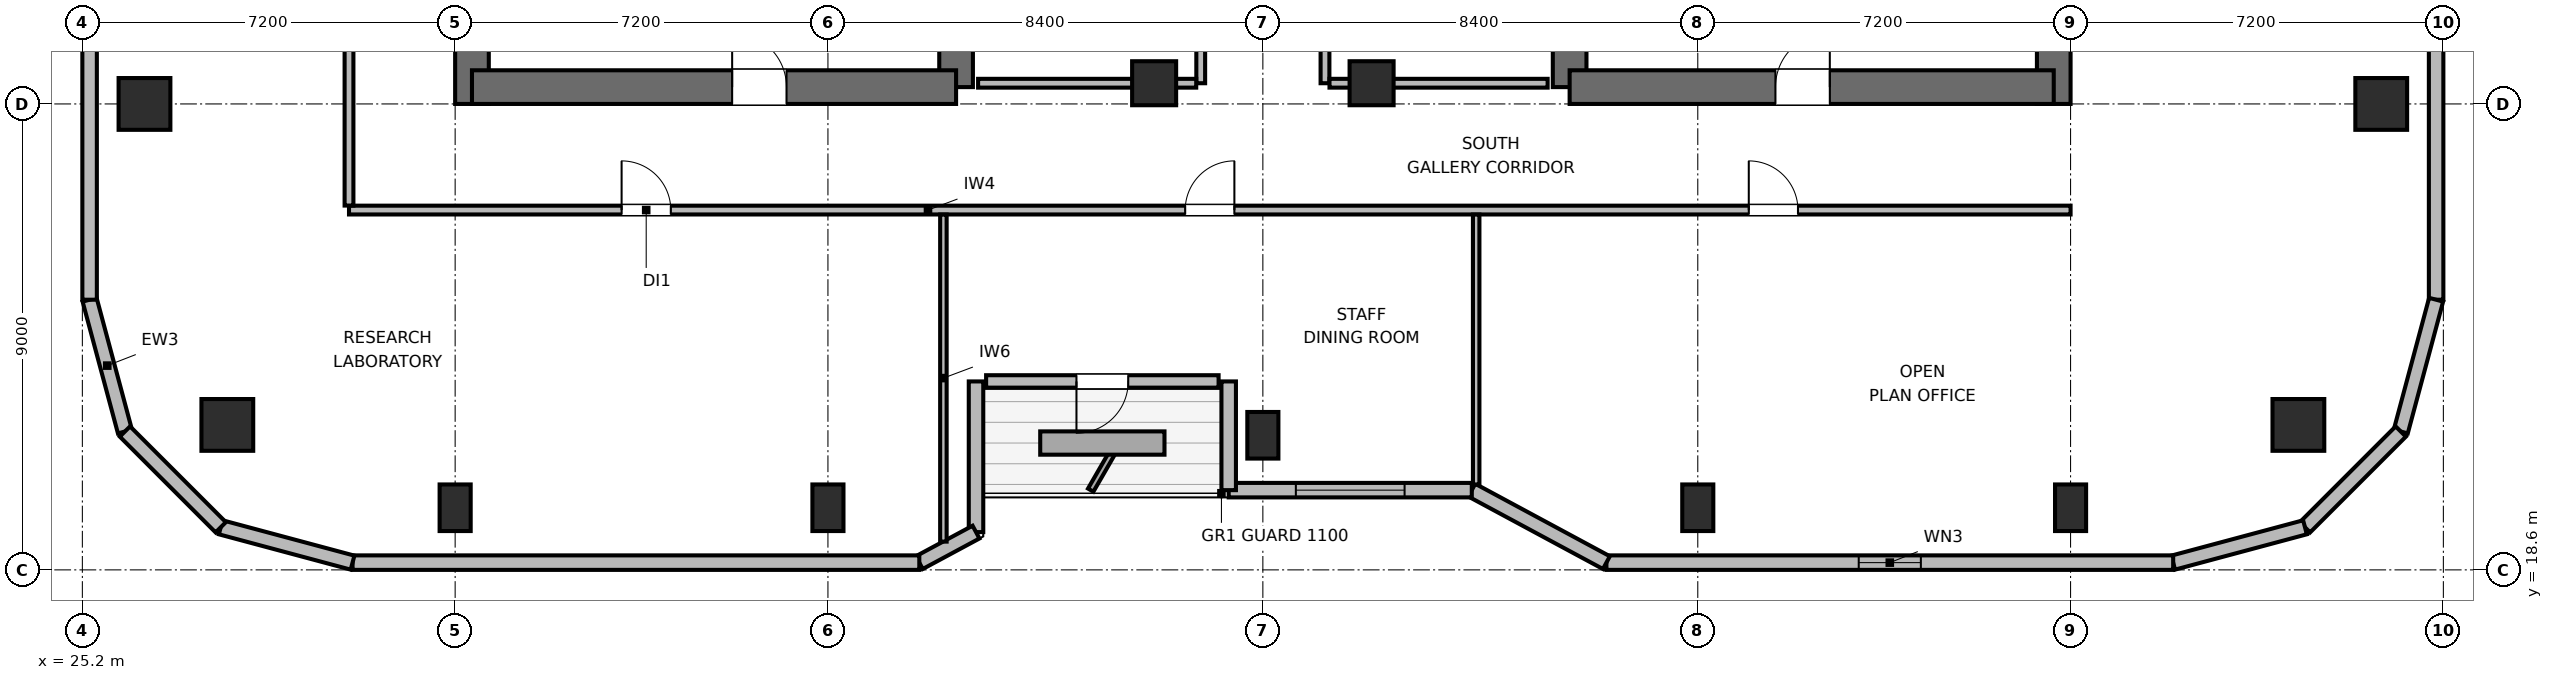
"""IFC4 building model, lengths in metres.
Left out: names, types, materials, properties, quantities, classifications, styles, units other than length and angle.
Written with IfcOpenShell. Run it as: python <this file> out.ifc"""

import sys

from ifc_helpers import new_model, si_unit, direction, frame, frame_2d, origin, origin_2d, place, context, subcontext, project, spatial, rectangle, circle, extrude, element, fill, save


model = new_model("IFC4")
c1 = context("Model", 3, precision=1e-05, world=origin(), true_north=direction((0.0, 1.0)))
c2 = subcontext(c1, "Body", "Model", "MODEL_VIEW")
j1 = project(units=[si_unit("LENGTHUNIT", "METRE"), si_unit("PLANEANGLEUNIT", "RADIAN")], contexts=[c1])
p1 = place(None, origin())
s1 = spatial("IfcSite", under=j1, at=p1, CompositionType="ELEMENT")
p2 = place(p1, origin())
s2 = spatial("IfcBuilding", under=s1, at=p2, CompositionType="ELEMENT")
p3 = place(p2, frame((0.0, 0.0, 231.0)))
s3 = spatial("IfcBuildingStorey", under=s2, at=p3, CompositionType="ELEMENT", Elevation=231.0)
p4 = place(p3, frame((32.725, 27.6, 0.0), z_axis=(0.0, 0.0, 1.0), x_axis=(0.0, 1.0, 0.0)))
e1 = element("IfcWall", 1, at=p4, inside=s3, PredefinedType="SHEAR", context=c2, shape_type="SweptSolid", body=[
    extrude(rectangle(XDim=16.8, YDim=0.65, at=frame_2d((8.4, 0.0))), origin(), (0.0, 0.0, 1.0), 3.9),
])
p5 = place(p3, frame((42.075, 27.925, 0.0), z_axis=(0.0, 0.0, 1.0), x_axis=(0.0, 1.0, 0.0)))
e2 = element("IfcWall", 2, at=p5, inside=s3, PredefinedType="SHEAR", context=c2, shape_type="SweptSolid", body=[
    extrude(rectangle(XDim=6.475, YDim=0.65, at=frame_2d((3.237, 0.0))), origin(), (0.0, 0.0, 1.0), 3.9),
])
p6 = place(p3, frame((32.725, 27.925, 0.0), z_axis=(0.0, 0.0, 1.0), x_axis=(1.0, 0.0, 0.0)))
e3 = element("IfcWall", 3, at=p6, inside=s3, PredefinedType="SHEAR", context=c2, shape_type="SweptSolid", body=[
    extrude(rectangle(XDim=9.35, YDim=0.65, at=frame_2d((4.675, 0.0))), origin(), (0.0, 0.0, 1.0), 3.9),
])
p7 = place(p6, frame((5.025, 0.0, 0.0)))
e4 = element("IfcOpeningElement", 4, at=p7, cuts=e3, PredefinedType="OPENING", context=c2, shape_type="SweptSolid", body=[
    extrude(rectangle(XDim=1.05, YDim=2.04, at=frame_2d((0.525, 1.02))), frame((0.0, 0.335, 0.0), z_axis=(0.0, -1.0, 0.0), x_axis=(1.0, 0.0, 0.0)), (0.0, 0.0, 1.0), 0.67),
])
p8 = place(p3, frame((53.925, 27.925, 0.0), z_axis=(0.0, 0.0, 1.0), x_axis=(0.0, 1.0, 0.0)))
e5 = element("IfcWall", 5, at=p8, inside=s3, PredefinedType="SHEAR", context=c2, shape_type="SweptSolid", body=[
    extrude(rectangle(XDim=7.875, YDim=0.65, at=frame_2d((3.938, 0.0))), origin(), (0.0, 0.0, 1.0), 3.9),
])
p9 = place(p3, frame((63.275, 27.6, 0.0), z_axis=(0.0, 0.0, 1.0), x_axis=(0.0, 1.0, 0.0)))
e6 = element("IfcWall", 6, at=p9, inside=s3, PredefinedType="SHEAR", context=c2, shape_type="SweptSolid", body=[
    extrude(rectangle(XDim=16.8, YDim=0.65, at=frame_2d((8.4, 0.0))), origin(), (0.0, 0.0, 1.0), 3.9),
])
p10 = place(p3, frame((53.925, 27.925, 0.0), z_axis=(0.0, 0.0, 1.0), x_axis=(1.0, 0.0, 0.0)))
e7 = element("IfcWall", 7, at=p10, inside=s3, PredefinedType="SHEAR", context=c2, shape_type="SweptSolid", body=[
    extrude(rectangle(XDim=9.35, YDim=0.65, at=frame_2d((4.675, 0.0))), origin(), (0.0, 0.0, 1.0), 3.9),
])
p11 = place(p10, frame((3.975, 0.0, 0.0)))
e8 = element("IfcOpeningElement", 8, at=p11, cuts=e7, PredefinedType="OPENING", context=c2, shape_type="SweptSolid", body=[
    extrude(rectangle(XDim=1.05, YDim=2.04, at=frame_2d((0.525, 1.02))), frame((0.0, 0.335, 0.0), z_axis=(0.0, -1.0, 0.0), x_axis=(1.0, 0.0, 0.0)), (0.0, 0.0, 1.0), 0.67),
])
for number, where, z_axis, x_axis in (
    (9, (28.0, 21.4, 0.0), (0.0, 0.0, 1.0), (1.0, 0.0, 0.0)),
    (10, (68.0, 21.4, 0.0), (0.0, 0.0, 1.0), (1.0, 0.0, 0.0)),
):
    element("IfcColumn", number, at=place(p3, frame(where, z_axis=z_axis, x_axis=x_axis)), inside=s3, PredefinedType="COLUMN", context=c2, shape_type="SweptSolid", body=[
        extrude(circle(Radius=0.5, at=origin_2d()), origin(), (0.0, 0.0, 1.0), 3.9),
    ])
for number, where, z_axis, x_axis in (
    (11, (32.4, 19.8, 0.0), (0.0, 0.0, 1.0), (1.0, 0.0, 0.0)),
    (12, (39.6, 19.8, 0.0), (0.0, 0.0, 1.0), (1.0, 0.0, 0.0)),
    (13, (48.0, 21.2, 0.0), (0.0, 0.0, 1.0), (1.0, 0.0, 0.0)),
    (14, (56.4, 19.8, 0.0), (0.0, 0.0, 1.0), (1.0, 0.0, 0.0)),
    (15, (63.6, 19.8, 0.0), (0.0, 0.0, 1.0), (1.0, 0.0, 0.0)),
):
    element("IfcColumn", number, at=place(p3, frame(where, z_axis=z_axis, x_axis=x_axis)), inside=s3, PredefinedType="COLUMN", context=c2, shape_type="SweptSolid", body=[
        extrude(rectangle(XDim=0.6, YDim=0.9, at=origin_2d()), origin(), (0.0, 0.0, 1.0), 3.9),
    ])
for number, where, z_axis, x_axis in (
    (16, (26.4, 27.6, 0.0), (0.0, 0.0, 1.0), (1.0, 0.0, 0.0)),
    (17, (69.6, 27.6, 0.0), (0.0, 0.0, 1.0), (1.0, 0.0, 0.0)),
):
    element("IfcColumn", number, at=place(p3, frame(where, z_axis=z_axis, x_axis=x_axis)), inside=s3, PredefinedType="COLUMN", context=c2, shape_type="SweptSolid", body=[
        extrude(rectangle(XDim=1.0, YDim=1.0, at=origin_2d()), origin(), (0.0, 0.0, 1.0), 3.9),
    ])
for number, where, z_axis, x_axis in (
    (18, (45.9, 28.0, 0.0), (0.0, 0.0, 1.0), (1.0, 0.0, 0.0)),
    (19, (50.1, 28.0, 0.0), (0.0, 0.0, 1.0), (1.0, 0.0, 0.0)),
):
    element("IfcColumn", number, at=place(p3, frame(where, z_axis=z_axis, x_axis=x_axis)), inside=s3, PredefinedType="COLUMN", context=c2, shape_type="SweptSolid", body=[
        extrude(rectangle(XDim=0.85, YDim=0.85, at=origin_2d()), origin(), (0.0, 0.0, 1.0), 3.9),
    ])
p12 = place(p3, frame((26.022, 21.272, 0.0), z_axis=(0.0, 0.0, 1.0), x_axis=(-0.2588904131, 0.965906700466, 0.0)))
e20 = element("IfcWall", 20, at=p12, inside=s3, PredefinedType="SOLIDWALL", context=c2, shape_type="SweptSolid", body=[
    extrude(rectangle(XDim=2.636, YDim=0.28, at=frame_2d((1.318, 0.0))), origin(), (0.0, 0.0, 1.0), 3.68),
])
p13 = place(p3, frame((25.34, 23.818, 0.0), z_axis=(0.0, 0.0, 1.0), x_axis=(0.0, 1.0, 0.0)))
e21 = element("IfcWall", 21, at=p13, inside=s3, PredefinedType="SOLIDWALL", context=c2, shape_type="SweptSolid", body=[
    extrude(rectangle(XDim=5.442, YDim=0.28, at=frame_2d((2.721, 0.0))), origin(), (0.0, 0.0, 1.0), 3.68),
])
p14 = place(p3, frame((70.66, 37.66, 0.0), z_axis=(0.0, 0.0, 1.0), x_axis=(0.0, -1.0, 0.0)))
e22 = element("IfcWall", 22, at=p14, inside=s3, PredefinedType="SOLIDWALL", context=c2, shape_type="SweptSolid", body=[
    extrude(rectangle(XDim=13.842, YDim=0.28, at=frame_2d((6.921, 0.0))), origin(), (0.0, 0.0, 1.0), 3.68),
])
p15 = place(p14, frame((5.871, 0.0, 0.85)))
e23 = element("IfcOpeningElement", 23, at=p15, cuts=e22, PredefinedType="OPENING", context=c2, shape_type="SweptSolid", body=[
    extrude(rectangle(XDim=2.1, YDim=1.05, at=frame_2d((1.05, 0.525))), frame((0.0, 0.15, 0.0), z_axis=(0.0, -1.0, 0.0), x_axis=(1.0, 0.0, 0.0)), (0.0, 0.0, 1.0), 0.3),
])
p16 = place(p3, frame((70.66, 23.818, 0.0), z_axis=(0.0, 0.0, 1.0), x_axis=(-0.2588904131, -0.965906700466, 0.0)))
e24 = element("IfcWall", 24, at=p16, inside=s3, PredefinedType="SOLIDWALL", context=c2, shape_type="SweptSolid", body=[
    extrude(rectangle(XDim=2.636, YDim=0.28, at=frame_2d((1.318, 0.0))), origin(), (0.0, 0.0, 1.0), 3.68),
])
p17 = place(p3, frame((69.978, 21.272, 0.0), z_axis=(0.0, 0.0, 1.0), x_axis=(-0.707153437963, -0.707060121331, 0.0)))
e25 = element("IfcWall", 25, at=p17, inside=s3, PredefinedType="SOLIDWALL", context=c2, shape_type="SweptSolid", body=[
    extrude(rectangle(XDim=2.616, YDim=0.28, at=frame_2d((1.308, 0.0))), origin(), (0.0, 0.0, 1.0), 3.68),
])
p18 = place(p3, frame((68.127, 19.423, 0.0), z_axis=(0.0, 0.0, 1.0), x_axis=(-0.965883534663, -0.258976828051, 0.0)))
e26 = element("IfcWall", 26, at=p18, inside=s3, PredefinedType="SOLIDWALL", context=c2, shape_type="SweptSolid", body=[
    extrude(rectangle(XDim=2.636, YDim=0.28, at=frame_2d((1.318, 0.0))), origin(), (0.0, 0.0, 1.0), 3.68),
])
p19 = place(p3, frame((65.582, 18.74, 0.0), z_axis=(0.0, 0.0, 1.0), x_axis=(-1.0, 0.0, 0.0)))
e27 = element("IfcWall", 27, at=p19, inside=s3, PredefinedType="SOLIDWALL", context=c2, shape_type="SweptSolid", body=[
    extrude(rectangle(XDim=10.946, YDim=0.28, at=frame_2d((5.473, 0.0))), origin(), (0.0, 0.0, 1.0), 3.68),
])
p20 = place(p19, frame((4.873, 0.0, 0.85)))
e28 = element("IfcOpeningElement", 28, at=p20, cuts=e27, PredefinedType="OPENING", context=c2, shape_type="SweptSolid", body=[
    extrude(rectangle(XDim=1.2, YDim=1.1, at=frame_2d((0.6, 0.55))), frame((0.0, 0.15, 0.0), z_axis=(0.0, -1.0, 0.0), x_axis=(1.0, 0.0, 0.0)), (0.0, 0.0, 1.0), 0.3),
])
p21 = place(p3, frame((54.635, 18.74, 0.0), z_axis=(0.0, 0.0, 1.0), x_axis=(-0.880473754814, 0.474094892488, 0.0)))
e29 = element("IfcWall", 29, at=p21, inside=s3, PredefinedType="SOLIDWALL", context=c2, shape_type="SweptSolid", body=[
    extrude(rectangle(XDim=2.953, YDim=0.28, at=frame_2d((1.477, 0.0))), origin(), (0.0, 0.0, 1.0), 2.265),
])
p22 = place(p3, frame((52.035, 20.14, 0.0), z_axis=(0.0, 0.0, 1.0), x_axis=(-1.0, 0.0, 0.0)))
e30 = element("IfcWall", 30, at=p22, inside=s3, PredefinedType="SOLIDWALL", context=c2, shape_type="SweptSolid", body=[
    extrude(rectangle(XDim=4.695, YDim=0.28, at=frame_2d((2.348, 0.0))), origin(), (0.0, 0.0, 1.0), 2.265),
])
p23 = place(p22, frame((1.298, 0.0, 0.85)))
e31 = element("IfcOpeningElement", 31, at=p23, cuts=e30, PredefinedType="OPENING", context=c2, shape_type="SweptSolid", body=[
    extrude(rectangle(XDim=2.1, YDim=1.05, at=frame_2d((1.05, 0.525))), frame((0.0, 0.15, 0.0), z_axis=(0.0, -1.0, 0.0), x_axis=(1.0, 0.0, 0.0)), (0.0, 0.0, 1.0), 0.3),
])
p24 = place(p3, frame((47.34, 20.14, 0.0), z_axis=(0.0, 0.0, 1.0), x_axis=(0.0, 1.0, 0.0)))
e32 = element("IfcWall", 32, at=p24, inside=s3, PredefinedType="SOLIDWALL", context=c2, shape_type="SweptSolid", body=[
    extrude(rectangle(XDim=2.1, YDim=0.28, at=frame_2d((1.05, 0.0))), origin(), (0.0, 0.0, 1.0), 2.265),
])
p25 = place(p3, frame((47.145, 22.24, 0.0), z_axis=(0.0, 0.0, 1.0), x_axis=(-1.0, 0.0, 0.0)))
e33 = element("IfcWall", 33, at=p25, inside=s3, PredefinedType="SOLIDWALL", context=c2, shape_type="SweptSolid", body=[
    extrude(rectangle(XDim=4.49, YDim=0.24, at=frame_2d((2.245, 0.0))), origin(), (0.0, 0.0, 1.0), 3.68),
])
p26 = place(p25, frame((1.745, 0.0, 0.0)))
e34 = element("IfcOpeningElement", 34, at=p26, cuts=e33, PredefinedType="OPENING", context=c2, shape_type="SweptSolid", body=[
    extrude(rectangle(XDim=1.0, YDim=2.02, at=frame_2d((0.5, 1.01))), frame((0.0, 0.13, 0.0), z_axis=(0.0, -1.0, 0.0), x_axis=(1.0, 0.0, 0.0)), (0.0, 0.0, 1.0), 0.26),
])
p27 = place(p3, frame((42.46, 22.24, 0.0), z_axis=(0.0, 0.0, 1.0), x_axis=(0.0, -1.0, 0.0)))
e35 = element("IfcWall", 35, at=p27, inside=s3, PredefinedType="SOLIDWALL", context=c2, shape_type="SweptSolid", body=[
    extrude(rectangle(XDim=2.91, YDim=0.28, at=frame_2d((1.455, 0.0))), origin(), (0.0, 0.0, 1.0), 2.265),
])
p28 = place(p3, frame((42.46, 19.33, 0.0), z_axis=(0.0, 0.0, 1.0), x_axis=(-0.880515214249, -0.474017887296, 0.0)))
e36 = element("IfcWall", 36, at=p28, inside=s3, PredefinedType="SOLIDWALL", context=c2, shape_type="SweptSolid", body=[
    extrude(rectangle(XDim=1.244, YDim=0.28, at=frame_2d((0.622, 0.0))), origin(), (0.0, 0.0, 1.0), 3.68),
])
p29 = place(p3, frame((41.365, 18.74, 0.0), z_axis=(0.0, 0.0, 1.0), x_axis=(-1.0, 0.0, 0.0)))
e37 = element("IfcWall", 37, at=p29, inside=s3, PredefinedType="SOLIDWALL", context=c2, shape_type="SweptSolid", body=[
    extrude(rectangle(XDim=10.946, YDim=0.28, at=frame_2d((5.473, 0.0))), origin(), (0.0, 0.0, 1.0), 3.68),
])
p30 = place(p3, frame((30.418, 18.74, 0.0), z_axis=(0.0, 0.0, 1.0), x_axis=(-0.965883534663, 0.258976828051, 0.0)))
e38 = element("IfcWall", 38, at=p30, inside=s3, PredefinedType="SOLIDWALL", context=c2, shape_type="SweptSolid", body=[
    extrude(rectangle(XDim=2.636, YDim=0.28, at=frame_2d((1.318, 0.0))), origin(), (0.0, 0.0, 1.0), 3.68),
])
p31 = place(p3, frame((27.873, 19.423, 0.0), z_axis=(0.0, 0.0, 1.0), x_axis=(-0.707153437963, 0.707060121331, 0.0)))
e39 = element("IfcWall", 39, at=p31, inside=s3, PredefinedType="SOLIDWALL", context=c2, shape_type="SweptSolid", body=[
    extrude(rectangle(XDim=2.616, YDim=0.28, at=frame_2d((1.308, 0.0))), origin(), (0.0, 0.0, 1.0), 3.68),
])
p32 = place(p3, frame((46.8, 28.0, 0.0), z_axis=(0.0, 0.0, 1.0), x_axis=(0.0, 1.0, 0.0)))
e40 = element("IfcWall", 40, at=p32, inside=s3, PredefinedType="PARTITIONING", context=c2, shape_type="SweptSolid", body=[
    extrude(rectangle(XDim=4.5, YDim=0.17, at=frame_2d((2.25, 0.0))), origin(), (0.0, 0.0, 1.0), 3.68),
])
p33 = place(p32, frame((0.99, 0.0, 0.0)))
e41 = element("IfcOpeningElement", 41, at=p33, cuts=e40, PredefinedType="OPENING", context=c2, shape_type="SweptSolid", body=[
    extrude(rectangle(XDim=0.9, YDim=2.02, at=frame_2d((0.45, 1.01))), frame((0.0, 0.095, 0.0), z_axis=(0.0, -1.0, 0.0), x_axis=(1.0, 0.0, 0.0)), (0.0, 0.0, 1.0), 0.19),
])
p34 = place(p32, frame((3.24, 0.0, 0.0)))
e42 = element("IfcOpeningElement", 42, at=p34, cuts=e40, PredefinedType="OPENING", context=c2, shape_type="SweptSolid", body=[
    extrude(rectangle(XDim=0.9, YDim=2.02, at=frame_2d((0.45, 1.01))), frame((0.0, 0.095, 0.0), z_axis=(0.0, -1.0, 0.0), x_axis=(1.0, 0.0, 0.0)), (0.0, 0.0, 1.0), 0.19),
])
p35 = place(p3, frame((42.5, 28.0, 0.0), z_axis=(0.0, 0.0, 1.0), x_axis=(1.0, 0.0, 0.0)))
e43 = element("IfcWall", 43, at=p35, inside=s3, PredefinedType="PARTITIONING", context=c2, shape_type="SweptSolid", body=[
    extrude(rectangle(XDim=4.213, YDim=0.17, at=frame_2d((2.106, 0.0))), origin(), (0.0, 0.0, 1.0), 2.765),
])
p36 = place(p3, frame((49.2, 28.0, 0.0), z_axis=(0.0, 0.0, 1.0), x_axis=(0.0, 1.0, 0.0)))
e44 = element("IfcWall", 44, at=p36, inside=s3, PredefinedType="PARTITIONING", context=c2, shape_type="SweptSolid", body=[
    extrude(rectangle(XDim=4.5, YDim=0.17, at=frame_2d((2.25, 0.0))), origin(), (0.0, 0.0, 1.0), 3.68),
])
p37 = place(p36, frame((0.675, 0.0, 0.0)))
e45 = element("IfcOpeningElement", 45, at=p37, cuts=e44, PredefinedType="OPENING", context=c2, shape_type="SweptSolid", body=[
    extrude(rectangle(XDim=0.9, YDim=2.02, at=frame_2d((0.45, 1.01))), frame((0.0, 0.095, 0.0), z_axis=(0.0, -1.0, 0.0), x_axis=(1.0, 0.0, 0.0)), (0.0, 0.0, 1.0), 0.19),
])
p38 = place(p36, frame((2.925, 0.0, 0.0)))
e46 = element("IfcOpeningElement", 46, at=p38, cuts=e44, PredefinedType="OPENING", context=c2, shape_type="SweptSolid", body=[
    extrude(rectangle(XDim=0.9, YDim=2.02, at=frame_2d((0.45, 1.01))), frame((0.0, 0.095, 0.0), z_axis=(0.0, -1.0, 0.0), x_axis=(1.0, 0.0, 0.0)), (0.0, 0.0, 1.0), 0.19),
])
p39 = place(p3, frame((49.287, 28.0, 0.0), z_axis=(0.0, 0.0, 1.0), x_axis=(1.0, 0.0, 0.0)))
e47 = element("IfcWall", 47, at=p39, inside=s3, PredefinedType="PARTITIONING", context=c2, shape_type="SweptSolid", body=[
    extrude(rectangle(XDim=4.213, YDim=0.17, at=frame_2d((2.106, 0.0))), origin(), (0.0, 0.0, 1.0), 2.765),
])
p40 = place(p3, frame((30.35, 25.55, 0.0), z_axis=(0.0, 0.0, 1.0), x_axis=(1.0, 0.0, 0.0)))
e48 = element("IfcWall", 48, at=p40, inside=s3, PredefinedType="PARTITIONING", context=c2, shape_type="SweptSolid", body=[
    extrude(rectangle(XDim=33.25, YDim=0.17, at=frame_2d((16.625, 0.0))), origin(), (0.0, 0.0, 1.0), 3.68),
])
p41 = place(p40, frame((5.265, 0.0, 0.0)))
e49 = element("IfcOpeningElement", 49, at=p41, cuts=e48, PredefinedType="OPENING", context=c2, shape_type="SweptSolid", body=[
    extrude(rectangle(XDim=0.95, YDim=2.04, at=frame_2d((0.475, 1.02))), frame((0.0, 0.095, 0.0), z_axis=(0.0, -1.0, 0.0), x_axis=(1.0, 0.0, 0.0)), (0.0, 0.0, 1.0), 0.19),
])
p42 = place(p40, frame((16.15, 0.0, 0.0)))
e50 = element("IfcOpeningElement", 50, at=p42, cuts=e48, PredefinedType="OPENING", context=c2, shape_type="SweptSolid", body=[
    extrude(rectangle(XDim=0.95, YDim=2.04, at=frame_2d((0.475, 1.02))), frame((0.0, 0.095, 0.0), z_axis=(0.0, -1.0, 0.0), x_axis=(1.0, 0.0, 0.0)), (0.0, 0.0, 1.0), 0.19),
])
p43 = place(p40, frame((27.035, 0.0, 0.0)))
e51 = element("IfcOpeningElement", 51, at=p43, cuts=e48, PredefinedType="OPENING", context=c2, shape_type="SweptSolid", body=[
    extrude(rectangle(XDim=0.95, YDim=2.04, at=frame_2d((0.475, 1.02))), frame((0.0, 0.095, 0.0), z_axis=(0.0, -1.0, 0.0), x_axis=(1.0, 0.0, 0.0)), (0.0, 0.0, 1.0), 0.19),
])
p44 = place(p3, frame((30.35, 25.637, 0.0), z_axis=(0.0, 0.0, 1.0), x_axis=(0.0, 1.0, 0.0)))
e52 = element("IfcWall", 52, at=p44, inside=s3, PredefinedType="PARTITIONING", context=c2, shape_type="SweptSolid", body=[
    extrude(rectangle(XDim=20.726, YDim=0.17, at=frame_2d((10.363, 0.0))), origin(), (0.0, 0.0, 1.0), 3.68),
])
p45 = place(p44, frame((9.888, 0.0, 0.0)))
e53 = element("IfcOpeningElement", 53, at=p45, cuts=e52, PredefinedType="OPENING", context=c2, shape_type="SweptSolid", body=[
    extrude(rectangle(XDim=0.95, YDim=2.04, at=frame_2d((0.475, 1.02))), frame((0.0, 0.095, 0.0), z_axis=(0.0, -1.0, 0.0), x_axis=(1.0, 0.0, 0.0)), (0.0, 0.0, 1.0), 0.19),
])
p46 = place(p3, frame((41.83, 19.146, 0.0), z_axis=(0.0, 0.0, 1.0), x_axis=(0.0, 1.0, 0.0)))
e54 = element("IfcWall", 54, at=p46, inside=s3, PredefinedType="PARTITIONING", context=c2, shape_type="SweptSolid", body=[
    extrude(rectangle(XDim=6.317, YDim=0.125, at=frame_2d((3.158, 0.0))), origin(), (0.0, 0.0, 1.0), 3.043),
])
p47 = place(p3, frame((52.12, 20.25, 0.0), z_axis=(0.0, 0.0, 1.0), x_axis=(0.0, 1.0, 0.0)))
e55 = element("IfcWall", 55, at=p47, inside=s3, PredefinedType="PARTITIONING", context=c2, shape_type="SweptSolid", body=[
    extrude(rectangle(XDim=5.213, YDim=0.125, at=frame_2d((2.606, 0.0))), origin(), (0.0, 0.0, 1.0), 3.043),
])
p48 = place(p20, origin())
e56 = element("IfcWindow", 56, at=p48, inside=s3, PartitioningType="SINGLE_PANEL", PredefinedType="WINDOW", context=c2, shape_type="SweptSolid", body=[
    extrude(rectangle(XDim=1.2, YDim=1.1, at=frame_2d((0.6, 0.55))), frame((0.0, 0.03, 0.0), z_axis=(0.0, -1.0, 0.0), x_axis=(1.0, 0.0, 0.0)), (0.0, 0.0, 1.0), 0.06),
])
fill(e28, e56)
p49 = place(p23, origin())
e57 = element("IfcWindow", 57, at=p49, inside=s3, PartitioningType="SINGLE_PANEL", PredefinedType="WINDOW", context=c2, shape_type="SweptSolid", body=[
    extrude(rectangle(XDim=2.1, YDim=1.05, at=frame_2d((1.05, 0.525))), frame((0.0, 0.03, 0.0), z_axis=(0.0, -1.0, 0.0), x_axis=(1.0, 0.0, 0.0)), (0.0, 0.0, 1.0), 0.06),
])
fill(e31, e57)
p50 = place(p26, origin())
e58 = element("IfcDoor", 58, at=p50, inside=s3, OperationType="SINGLE_SWING_RIGHT", PredefinedType="DOOR", context=c2, shape_type="SweptSolid", body=[
    extrude(rectangle(XDim=1.0, YDim=2.02, at=frame_2d((0.5, 1.01))), frame((0.0, 0.025, 0.0), z_axis=(0.0, -1.0, 0.0), x_axis=(1.0, 0.0, 0.0)), (0.0, 0.0, 1.0), 0.05),
])
fill(e34, e58)
p51 = place(p7, origin())
e59 = element("IfcDoor", 59, at=p51, inside=s3, OperationType="SINGLE_SWING_LEFT", PredefinedType="DOOR", context=c2, shape_type="SweptSolid", body=[
    extrude(rectangle(XDim=1.05, YDim=2.04, at=frame_2d((0.525, 1.02))), frame((0.0, 0.025, 0.0), z_axis=(0.0, -1.0, 0.0), x_axis=(1.0, 0.0, 0.0)), (0.0, 0.0, 1.0), 0.05),
])
fill(e4, e59)
p52 = place(p11, origin())
e60 = element("IfcDoor", 60, at=p52, inside=s3, OperationType="SINGLE_SWING_RIGHT", PredefinedType="DOOR", context=c2, shape_type="SweptSolid", body=[
    extrude(rectangle(XDim=1.05, YDim=2.04, at=frame_2d((0.525, 1.02))), frame((0.0, 0.025, 0.0), z_axis=(0.0, -1.0, 0.0), x_axis=(1.0, 0.0, 0.0)), (0.0, 0.0, 1.0), 0.05),
])
fill(e8, e60)
p53 = place(p41, origin())
e61 = element("IfcDoor", 61, at=p53, inside=s3, OperationType="SINGLE_SWING_LEFT", PredefinedType="DOOR", context=c2, shape_type="SweptSolid", body=[
    extrude(rectangle(XDim=0.95, YDim=2.04, at=frame_2d((0.475, 1.02))), frame((0.0, 0.025, 0.0), z_axis=(0.0, -1.0, 0.0), x_axis=(1.0, 0.0, 0.0)), (0.0, 0.0, 1.0), 0.05),
])
fill(e49, e61)
p54 = place(p42, origin())
e62 = element("IfcDoor", 62, at=p54, inside=s3, OperationType="SINGLE_SWING_RIGHT", PredefinedType="DOOR", context=c2, shape_type="SweptSolid", body=[
    extrude(rectangle(XDim=0.95, YDim=2.04, at=frame_2d((0.475, 1.02))), frame((0.0, 0.025, 0.0), z_axis=(0.0, -1.0, 0.0), x_axis=(1.0, 0.0, 0.0)), (0.0, 0.0, 1.0), 0.05),
])
fill(e50, e62)
p55 = place(p43, origin())
e63 = element("IfcDoor", 63, at=p55, inside=s3, OperationType="SINGLE_SWING_LEFT", PredefinedType="DOOR", context=c2, shape_type="SweptSolid", body=[
    extrude(rectangle(XDim=0.95, YDim=2.04, at=frame_2d((0.475, 1.02))), frame((0.0, 0.025, 0.0), z_axis=(0.0, -1.0, 0.0), x_axis=(1.0, 0.0, 0.0)), (0.0, 0.0, 1.0), 0.05),
])
fill(e51, e63)
save(model, sys.argv[1])
